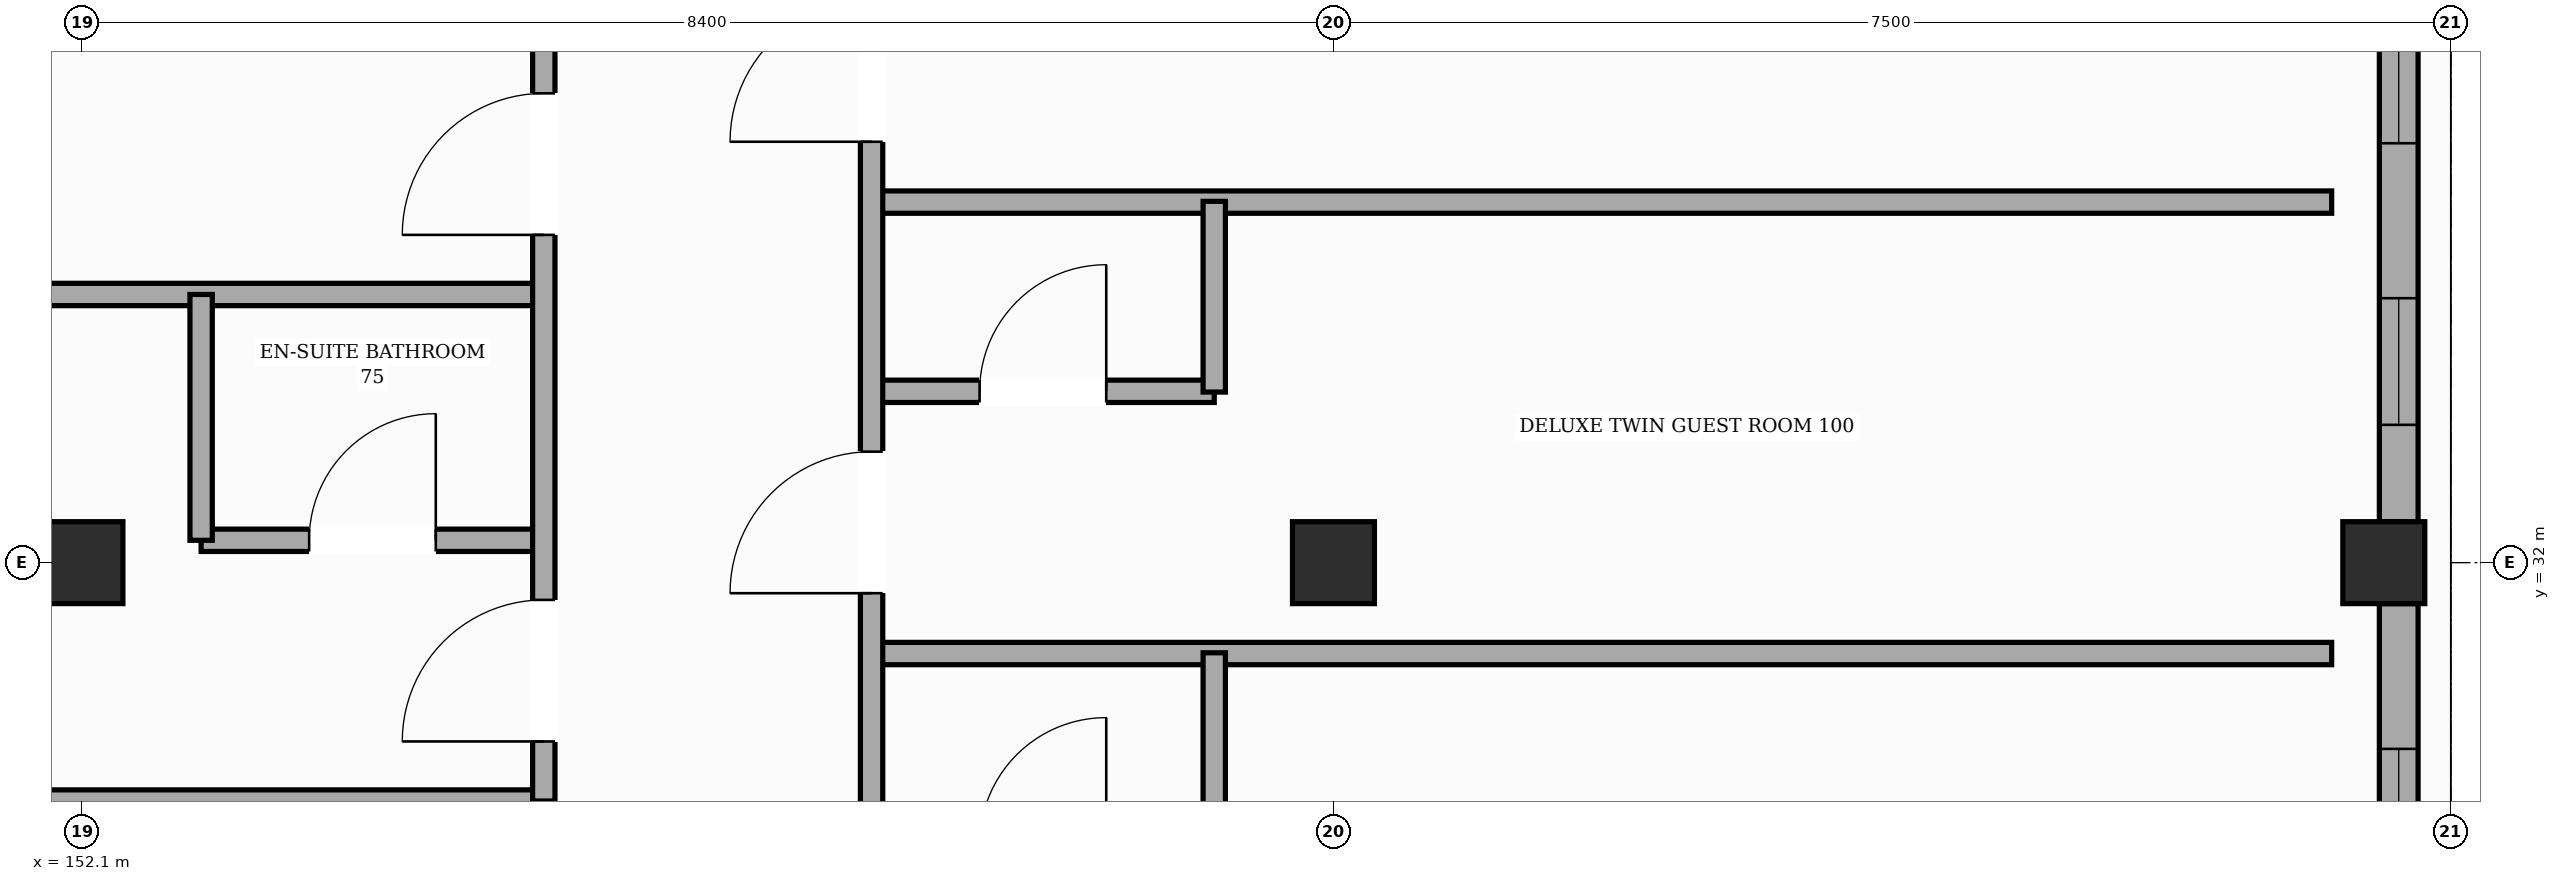
"""IFC4 building model, lengths in metres.
Left out: names, types, materials, properties, quantities, classifications, styles, units other than length and angle.
Written with IfcOpenShell. Run it as: python <this file> out.ifc"""

import sys

from ifc_helpers import new_model, si_unit, direction, frame, frame_2d, origin, origin_2d, place, context, subcontext, project, spatial, rectangle, hollow_rectangle, extrude, element, fill, save


model = new_model("IFC4")
c1 = context("Model", 3, precision=1e-05, world=origin(), true_north=direction((0.0, 1.0)))
c2 = subcontext(c1, "Body", "Model", "MODEL_VIEW")
j1 = project(units=[si_unit("LENGTHUNIT", "METRE"), si_unit("PLANEANGLEUNIT", "RADIAN")], contexts=[c1])
p1 = place(None, origin())
s1 = spatial("IfcSite", under=j1, at=p1, CompositionType="ELEMENT")
p2 = place(p1, origin())
s2 = spatial("IfcBuilding", under=s1, at=p2, CompositionType="ELEMENT")
p3 = place(p2, frame((0.0, 0.0, 24.6)))
s3 = spatial("IfcBuildingStorey", under=s2, at=p3, CompositionType="ELEMENT", Elevation=24.6)
for number, where, z_axis, x_axis in (
    (1, (152.1, 32.0, 0.0), (0.0, 0.0, 1.0), (1.0, 0.0, 0.0)),
    (2, (160.5, 32.0, 0.0), (0.0, 0.0, 1.0), (1.0, 0.0, 0.0)),
    (3, (167.55, 32.0, 0.0), (0.0, 0.0, 1.0), (1.0, 0.0, 0.0)),
):
    element("IfcColumn", number, at=place(p3, frame(where, z_axis=z_axis, x_axis=x_axis)), inside=s3, PredefinedType="COLUMN", context=c2, shape_type="SweptSolid", body=[
        extrude(hollow_rectangle(XDim=0.55, YDim=0.55, WallThickness=0.022, InnerFilletRadius=0.022, OuterFilletRadius=0.044, at=origin_2d()), origin(), (0.0, 0.0, 1.0), 3.6),
    ])
p4 = place(p3, frame((167.65, 31.725, 0.0), z_axis=(0.0, 0.0, 1.0), x_axis=(0.0, -1.0, 0.0)))
e4 = element("IfcWall", 4, at=p4, inside=s3, PredefinedType="SOLIDWALL", context=c2, shape_type="SweptSolid", body=[
    extrude(rectangle(XDim=7.45, YDim=0.26, at=frame_2d((3.725, 0.0))), origin(), (0.0, 0.0, 1.0), 2.755),
])
p5 = place(p4, frame((4.105, 0.0, 0.85)))
e5 = element("IfcOpeningElement", 5, at=p5, cuts=e4, PredefinedType="OPENING", context=c2, shape_type="SweptSolid", body=[
    extrude(rectangle(XDim=1.55, YDim=1.35, at=frame_2d((0.775, 0.675))), frame((0.0, 0.14, 0.0), z_axis=(0.0, -1.0, 0.0), x_axis=(1.0, 0.0, 0.0)), (0.0, 0.0, 1.0), 0.28),
])
p6 = place(p4, frame((0.975, 0.0, 0.85)))
e6 = element("IfcOpeningElement", 6, at=p6, cuts=e4, PredefinedType="OPENING", context=c2, shape_type="SweptSolid", body=[
    extrude(rectangle(XDim=1.75, YDim=1.35, at=frame_2d((0.875, 0.675))), frame((0.0, 0.14, 0.0), z_axis=(0.0, -1.0, 0.0), x_axis=(1.0, 0.0, 0.0)), (0.0, 0.0, 1.0), 0.28),
])
p7 = place(p3, frame((167.65, 40.625, 0.0), z_axis=(0.0, 0.0, 1.0), x_axis=(0.0, -1.0, 0.0)))
e7 = element("IfcWall", 7, at=p7, inside=s3, PredefinedType="SOLIDWALL", context=c2, shape_type="SweptSolid", body=[
    extrude(rectangle(XDim=8.35, YDim=0.26, at=frame_2d((4.175, 0.0))), origin(), (0.0, 0.0, 1.0), 2.755),
])
p8 = place(p7, frame((6.85, 0.0, 0.85)))
e8 = element("IfcOpeningElement", 8, at=p8, cuts=e7, PredefinedType="OPENING", context=c2, shape_type="SweptSolid", body=[
    extrude(rectangle(XDim=0.85, YDim=1.35, at=frame_2d((0.425, 0.675))), frame((0.0, 0.14, 0.0), z_axis=(0.0, -1.0, 0.0), x_axis=(1.0, 0.0, 0.0)), (0.0, 0.0, 1.0), 0.28),
])
p9 = place(p7, frame((3.56, 0.0, 0.85)))
e9 = element("IfcOpeningElement", 9, at=p9, cuts=e7, PredefinedType="OPENING", context=c2, shape_type="SweptSolid", body=[
    extrude(rectangle(XDim=2.25, YDim=1.35, at=frame_2d((1.125, 0.675))), frame((0.0, 0.14, 0.0), z_axis=(0.0, -1.0, 0.0), x_axis=(1.0, 0.0, 0.0)), (0.0, 0.0, 1.0), 0.28),
])
p10 = place(p7, frame((1.03, 0.0, 0.85)))
e10 = element("IfcOpeningElement", 10, at=p10, cuts=e7, PredefinedType="OPENING", context=c2, shape_type="SweptSolid", body=[
    extrude(rectangle(XDim=1.25, YDim=1.35, at=frame_2d((0.625, 0.675))), frame((0.0, 0.14, 0.0), z_axis=(0.0, -1.0, 0.0), x_axis=(1.0, 0.0, 0.0)), (0.0, 0.0, 1.0), 0.28),
])
p11 = place(p3, frame((144.2, 30.4, 0.0), z_axis=(0.0, 0.0, 1.0), x_axis=(1.0, 0.0, 0.0)))
e11 = element("IfcWall", 11, at=p11, inside=s3, PredefinedType="PARTITIONING", context=c2, shape_type="SweptSolid", body=[
    extrude(rectangle(XDim=11.0, YDim=0.15, at=frame_2d((5.5, 0.0))), origin(), (0.0, 0.0, 1.0), 3.365),
])
p12 = place(p3, frame((157.4, 31.39, 0.0), z_axis=(0.0, 0.0, 1.0), x_axis=(1.0, 0.0, 0.0)))
e12 = element("IfcWall", 12, at=p12, inside=s3, PredefinedType="PARTITIONING", context=c2, shape_type="SweptSolid", body=[
    extrude(rectangle(XDim=9.8, YDim=0.15, at=frame_2d((4.9, 0.0))), origin(), (0.0, 0.0, 1.0), 3.365),
])
p13 = place(p3, frame((152.9, 32.15, 0.0), z_axis=(0.0, 0.0, 1.0), x_axis=(1.0, 0.0, 0.0)))
e13 = element("IfcWall", 13, at=p13, inside=s3, PredefinedType="PARTITIONING", context=c2, shape_type="SweptSolid", body=[
    extrude(rectangle(XDim=2.3, YDim=0.15, at=frame_2d((1.15, 0.0))), origin(), (0.0, 0.0, 1.0), 2.805),
])
p14 = place(p13, frame((0.725, 0.0, 0.0)))
e14 = element("IfcOpeningElement", 14, at=p14, cuts=e13, PredefinedType="OPENING", context=c2, shape_type="SweptSolid", body=[
    extrude(rectangle(XDim=0.85, YDim=2.1, at=frame_2d((0.425, 1.05))), frame((0.0, 0.085, 0.0), z_axis=(0.0, -1.0, 0.0), x_axis=(1.0, 0.0, 0.0)), (0.0, 0.0, 1.0), 0.17),
])
p15 = place(p3, frame((157.4, 33.15, 0.0), z_axis=(0.0, 0.0, 1.0), x_axis=(1.0, 0.0, 0.0)))
e15 = element("IfcWall", 15, at=p15, inside=s3, PredefinedType="PARTITIONING", context=c2, shape_type="SweptSolid", body=[
    extrude(rectangle(XDim=2.3, YDim=0.15, at=frame_2d((1.15, 0.0))), origin(), (0.0, 0.0, 1.0), 3.365),
])
p16 = place(p15, frame((0.725, 0.0, 0.0)))
e16 = element("IfcOpeningElement", 16, at=p16, cuts=e15, PredefinedType="OPENING", context=c2, shape_type="SweptSolid", body=[
    extrude(rectangle(XDim=0.85, YDim=2.1, at=frame_2d((0.425, 1.05))), frame((0.0, 0.085, 0.0), z_axis=(0.0, -1.0, 0.0), x_axis=(1.0, 0.0, 0.0)), (0.0, 0.0, 1.0), 0.17),
])
p17 = place(p3, frame((144.2, 33.8, 0.0), z_axis=(0.0, 0.0, 1.0), x_axis=(1.0, 0.0, 0.0)))
e17 = element("IfcWall", 17, at=p17, inside=s3, PredefinedType="PARTITIONING", context=c2, shape_type="SweptSolid", body=[
    extrude(rectangle(XDim=11.0, YDim=0.15, at=frame_2d((5.5, 0.0))), origin(), (0.0, 0.0, 1.0), 3.365),
])
p18 = place(p3, frame((157.4, 34.42, 0.0), z_axis=(0.0, 0.0, 1.0), x_axis=(1.0, 0.0, 0.0)))
e18 = element("IfcWall", 18, at=p18, inside=s3, PredefinedType="PARTITIONING", context=c2, shape_type="SweptSolid", body=[
    extrude(rectangle(XDim=9.8, YDim=0.15, at=frame_2d((4.9, 0.0))), origin(), (0.0, 0.0, 1.0), 3.365),
])
p19 = place(p3, frame((152.9, 32.15, 0.0), z_axis=(0.0, 0.0, 1.0), x_axis=(0.0, 1.0, 0.0)))
e19 = element("IfcWall", 19, at=p19, inside=s3, PredefinedType="PARTITIONING", context=c2, shape_type="SweptSolid", body=[
    extrude(rectangle(XDim=1.65, YDim=0.15, at=frame_2d((0.825, 0.0))), origin(), (0.0, 0.0, 1.0), 3.365),
])
p20 = place(p3, frame((155.2, 30.4, 0.0), z_axis=(0.0, 0.0, 1.0), x_axis=(0.0, 1.0, 0.0)))
e20 = element("IfcWall", 20, at=p20, inside=s3, PredefinedType="PARTITIONING", context=c2, shape_type="SweptSolid", body=[
    extrude(rectangle(XDim=10.2, YDim=0.15, at=frame_2d((5.1, 0.0))), origin(), (0.0, 0.0, 1.0), 3.365),
])
p21 = place(p20, frame((0.4, 0.0, 0.0)))
e21 = element("IfcOpeningElement", 21, at=p21, cuts=e20, PredefinedType="OPENING", context=c2, shape_type="SweptSolid", body=[
    extrude(rectangle(XDim=0.95, YDim=2.15, at=frame_2d((0.475, 1.075))), frame((0.0, 0.085, 0.0), z_axis=(0.0, -1.0, 0.0), x_axis=(1.0, 0.0, 0.0)), (0.0, 0.0, 1.0), 0.17),
])
p22 = place(p20, frame((3.8, 0.0, 0.0)))
e22 = element("IfcOpeningElement", 22, at=p22, cuts=e20, PredefinedType="OPENING", context=c2, shape_type="SweptSolid", body=[
    extrude(rectangle(XDim=0.95, YDim=2.15, at=frame_2d((0.475, 1.075))), frame((0.0, 0.085, 0.0), z_axis=(0.0, -1.0, 0.0), x_axis=(1.0, 0.0, 0.0)), (0.0, 0.0, 1.0), 0.17),
])
p23 = place(p20, frame((7.2, 0.0, 0.0)))
e23 = element("IfcOpeningElement", 23, at=p23, cuts=e20, PredefinedType="OPENING", context=c2, shape_type="SweptSolid", body=[
    extrude(rectangle(XDim=0.95, YDim=2.15, at=frame_2d((0.475, 1.075))), frame((0.0, 0.085, 0.0), z_axis=(0.0, -1.0, 0.0), x_axis=(1.0, 0.0, 0.0)), (0.0, 0.0, 1.0), 0.17),
])
p24 = place(p3, frame((157.4, 22.3, 0.0), z_axis=(0.0, 0.0, 1.0), x_axis=(0.0, 1.0, 0.0)))
e24 = element("IfcWall", 24, at=p24, inside=s3, PredefinedType="PARTITIONING", context=c2, shape_type="SweptSolid", body=[
    extrude(rectangle(XDim=48.5, YDim=0.15, at=frame_2d((24.25, 0.0))), origin(), (0.0, 0.0, 1.0), 3.365),
])
p25 = place(p24, frame((0.4, 0.0, 0.0)))
e25 = element("IfcOpeningElement", 25, at=p25, cuts=e24, PredefinedType="OPENING", context=c2, shape_type="SweptSolid", body=[
    extrude(rectangle(XDim=0.95, YDim=2.15, at=frame_2d((0.475, 1.075))), frame((0.0, 0.085, 0.0), z_axis=(0.0, -1.0, 0.0), x_axis=(1.0, 0.0, 0.0)), (0.0, 0.0, 1.0), 0.17),
])
p26 = place(p24, frame((3.43, 0.0, 0.0)))
e26 = element("IfcOpeningElement", 26, at=p26, cuts=e24, PredefinedType="OPENING", context=c2, shape_type="SweptSolid", body=[
    extrude(rectangle(XDim=0.95, YDim=2.15, at=frame_2d((0.475, 1.075))), frame((0.0, 0.085, 0.0), z_axis=(0.0, -1.0, 0.0), x_axis=(1.0, 0.0, 0.0)), (0.0, 0.0, 1.0), 0.17),
])
p27 = place(p24, frame((6.46, 0.0, 0.0)))
e27 = element("IfcOpeningElement", 27, at=p27, cuts=e24, PredefinedType="OPENING", context=c2, shape_type="SweptSolid", body=[
    extrude(rectangle(XDim=0.95, YDim=2.15, at=frame_2d((0.475, 1.075))), frame((0.0, 0.085, 0.0), z_axis=(0.0, -1.0, 0.0), x_axis=(1.0, 0.0, 0.0)), (0.0, 0.0, 1.0), 0.17),
])
p28 = place(p24, frame((9.495, 0.0, 0.0)))
e28 = element("IfcOpeningElement", 28, at=p28, cuts=e24, PredefinedType="OPENING", context=c2, shape_type="SweptSolid", body=[
    extrude(rectangle(XDim=0.95, YDim=2.15, at=frame_2d((0.475, 1.075))), frame((0.0, 0.085, 0.0), z_axis=(0.0, -1.0, 0.0), x_axis=(1.0, 0.0, 0.0)), (0.0, 0.0, 1.0), 0.17),
])
p29 = place(p24, frame((12.525, 0.0, 0.0)))
e29 = element("IfcOpeningElement", 29, at=p29, cuts=e24, PredefinedType="OPENING", context=c2, shape_type="SweptSolid", body=[
    extrude(rectangle(XDim=0.95, YDim=2.15, at=frame_2d((0.475, 1.075))), frame((0.0, 0.085, 0.0), z_axis=(0.0, -1.0, 0.0), x_axis=(1.0, 0.0, 0.0)), (0.0, 0.0, 1.0), 0.17),
])
p30 = place(p24, frame((15.555, 0.0, 0.0)))
e30 = element("IfcOpeningElement", 30, at=p30, cuts=e24, PredefinedType="OPENING", context=c2, shape_type="SweptSolid", body=[
    extrude(rectangle(XDim=0.95, YDim=2.15, at=frame_2d((0.475, 1.075))), frame((0.0, 0.085, 0.0), z_axis=(0.0, -1.0, 0.0), x_axis=(1.0, 0.0, 0.0)), (0.0, 0.0, 1.0), 0.17),
])
p31 = place(p24, frame((18.585, 0.0, 0.0)))
e31 = element("IfcOpeningElement", 31, at=p31, cuts=e24, PredefinedType="OPENING", context=c2, shape_type="SweptSolid", body=[
    extrude(rectangle(XDim=0.95, YDim=2.15, at=frame_2d((0.475, 1.075))), frame((0.0, 0.085, 0.0), z_axis=(0.0, -1.0, 0.0), x_axis=(1.0, 0.0, 0.0)), (0.0, 0.0, 1.0), 0.17),
])
p32 = place(p24, frame((21.62, 0.0, 0.0)))
e32 = element("IfcOpeningElement", 32, at=p32, cuts=e24, PredefinedType="OPENING", context=c2, shape_type="SweptSolid", body=[
    extrude(rectangle(XDim=0.95, YDim=2.15, at=frame_2d((0.475, 1.075))), frame((0.0, 0.085, 0.0), z_axis=(0.0, -1.0, 0.0), x_axis=(1.0, 0.0, 0.0)), (0.0, 0.0, 1.0), 0.17),
])
p33 = place(p24, frame((24.65, 0.0, 0.0)))
e33 = element("IfcOpeningElement", 33, at=p33, cuts=e24, PredefinedType="OPENING", context=c2, shape_type="SweptSolid", body=[
    extrude(rectangle(XDim=0.95, YDim=2.15, at=frame_2d((0.475, 1.075))), frame((0.0, 0.085, 0.0), z_axis=(0.0, -1.0, 0.0), x_axis=(1.0, 0.0, 0.0)), (0.0, 0.0, 1.0), 0.17),
])
p34 = place(p24, frame((27.68, 0.0, 0.0)))
e34 = element("IfcOpeningElement", 34, at=p34, cuts=e24, PredefinedType="OPENING", context=c2, shape_type="SweptSolid", body=[
    extrude(rectangle(XDim=0.95, YDim=2.15, at=frame_2d((0.475, 1.075))), frame((0.0, 0.085, 0.0), z_axis=(0.0, -1.0, 0.0), x_axis=(1.0, 0.0, 0.0)), (0.0, 0.0, 1.0), 0.17),
])
p35 = place(p24, frame((30.71, 0.0, 0.0)))
e35 = element("IfcOpeningElement", 35, at=p35, cuts=e24, PredefinedType="OPENING", context=c2, shape_type="SweptSolid", body=[
    extrude(rectangle(XDim=0.95, YDim=2.15, at=frame_2d((0.475, 1.075))), frame((0.0, 0.085, 0.0), z_axis=(0.0, -1.0, 0.0), x_axis=(1.0, 0.0, 0.0)), (0.0, 0.0, 1.0), 0.17),
])
p36 = place(p24, frame((33.745, 0.0, 0.0)))
e36 = element("IfcOpeningElement", 36, at=p36, cuts=e24, PredefinedType="OPENING", context=c2, shape_type="SweptSolid", body=[
    extrude(rectangle(XDim=0.95, YDim=2.15, at=frame_2d((0.475, 1.075))), frame((0.0, 0.085, 0.0), z_axis=(0.0, -1.0, 0.0), x_axis=(1.0, 0.0, 0.0)), (0.0, 0.0, 1.0), 0.17),
])
p37 = place(p24, frame((36.775, 0.0, 0.0)))
e37 = element("IfcOpeningElement", 37, at=p37, cuts=e24, PredefinedType="OPENING", context=c2, shape_type="SweptSolid", body=[
    extrude(rectangle(XDim=0.95, YDim=2.15, at=frame_2d((0.475, 1.075))), frame((0.0, 0.085, 0.0), z_axis=(0.0, -1.0, 0.0), x_axis=(1.0, 0.0, 0.0)), (0.0, 0.0, 1.0), 0.17),
])
p38 = place(p24, frame((39.805, 0.0, 0.0)))
e38 = element("IfcOpeningElement", 38, at=p38, cuts=e24, PredefinedType="OPENING", context=c2, shape_type="SweptSolid", body=[
    extrude(rectangle(XDim=0.95, YDim=2.15, at=frame_2d((0.475, 1.075))), frame((0.0, 0.085, 0.0), z_axis=(0.0, -1.0, 0.0), x_axis=(1.0, 0.0, 0.0)), (0.0, 0.0, 1.0), 0.17),
])
p39 = place(p24, frame((42.84, 0.0, 0.0)))
e39 = element("IfcOpeningElement", 39, at=p39, cuts=e24, PredefinedType="OPENING", context=c2, shape_type="SweptSolid", body=[
    extrude(rectangle(XDim=0.95, YDim=2.15, at=frame_2d((0.475, 1.075))), frame((0.0, 0.085, 0.0), z_axis=(0.0, -1.0, 0.0), x_axis=(1.0, 0.0, 0.0)), (0.0, 0.0, 1.0), 0.17),
])
p40 = place(p24, frame((45.87, 0.0, 0.0)))
e40 = element("IfcOpeningElement", 40, at=p40, cuts=e24, PredefinedType="OPENING", context=c2, shape_type="SweptSolid", body=[
    extrude(rectangle(XDim=0.95, YDim=2.15, at=frame_2d((0.475, 1.075))), frame((0.0, 0.085, 0.0), z_axis=(0.0, -1.0, 0.0), x_axis=(1.0, 0.0, 0.0)), (0.0, 0.0, 1.0), 0.17),
])
p41 = place(p3, frame((159.7, 30.11, 0.0), z_axis=(0.0, 0.0, 1.0), x_axis=(0.0, 1.0, 0.0)))
e41 = element("IfcWall", 41, at=p41, inside=s3, PredefinedType="PARTITIONING", context=c2, shape_type="SweptSolid", body=[
    extrude(rectangle(XDim=1.285, YDim=0.15, at=frame_2d((0.643, 0.0))), origin(), (0.0, 0.0, 1.0), 3.365),
])
p42 = place(p3, frame((159.7, 33.145, 0.0), z_axis=(0.0, 0.0, 1.0), x_axis=(0.0, 1.0, 0.0)))
e42 = element("IfcWall", 42, at=p42, inside=s3, PredefinedType="PARTITIONING", context=c2, shape_type="SweptSolid", body=[
    extrude(rectangle(XDim=1.28, YDim=0.15, at=frame_2d((0.64, 0.0))), origin(), (0.0, 0.0, 1.0), 3.365),
])
p43 = place(p6, origin())
e43 = element("IfcWindow", 43, at=p43, inside=s3, PartitioningType="SINGLE_PANEL", PredefinedType="WINDOW", context=c2, shape_type="SweptSolid", body=[
    extrude(rectangle(XDim=1.75, YDim=1.35, at=frame_2d((0.875, 0.675))), frame((0.0, 0.03, 0.0), z_axis=(0.0, -1.0, 0.0), x_axis=(1.0, 0.0, 0.0)), (0.0, 0.0, 1.0), 0.06),
])
fill(e6, e43)
p44 = place(p8, origin())
e44 = element("IfcWindow", 44, at=p44, inside=s3, PartitioningType="SINGLE_PANEL", PredefinedType="WINDOW", context=c2, shape_type="SweptSolid", body=[
    extrude(rectangle(XDim=0.85, YDim=1.35, at=frame_2d((0.425, 0.675))), frame((0.0, 0.03, 0.0), z_axis=(0.0, -1.0, 0.0), x_axis=(1.0, 0.0, 0.0)), (0.0, 0.0, 1.0), 0.06),
])
fill(e8, e44)
p45 = place(p9, origin())
e45 = element("IfcWindow", 45, at=p45, inside=s3, PartitioningType="SINGLE_PANEL", PredefinedType="WINDOW", context=c2, shape_type="SweptSolid", body=[
    extrude(rectangle(XDim=2.25, YDim=1.35, at=frame_2d((1.125, 0.675))), frame((0.0, 0.03, 0.0), z_axis=(0.0, -1.0, 0.0), x_axis=(1.0, 0.0, 0.0)), (0.0, 0.0, 1.0), 0.06),
])
fill(e9, e45)
p46 = place(p21, origin())
e46 = element("IfcDoor", 46, at=p46, inside=s3, OperationType="SINGLE_SWING_LEFT", PredefinedType="DOOR", context=c2, shape_type="SweptSolid", body=[
    extrude(rectangle(XDim=0.95, YDim=2.15, at=frame_2d((0.475, 1.075))), frame((0.0, 0.025, 0.0), z_axis=(0.0, -1.0, 0.0), x_axis=(1.0, 0.0, 0.0)), (0.0, 0.0, 1.0), 0.05),
])
fill(e21, e46)
p47 = place(p14, origin())
e47 = element("IfcDoor", 47, at=p47, inside=s3, OperationType="SINGLE_SWING_RIGHT", PredefinedType="DOOR", context=c2, shape_type="SweptSolid", body=[
    extrude(rectangle(XDim=0.85, YDim=2.1, at=frame_2d((0.425, 1.05))), frame((0.0, 0.025, 0.0), z_axis=(0.0, -1.0, 0.0), x_axis=(1.0, 0.0, 0.0)), (0.0, 0.0, 1.0), 0.05),
])
fill(e14, e47)
p48 = place(p22, origin())
e48 = element("IfcDoor", 48, at=p48, inside=s3, OperationType="SINGLE_SWING_LEFT", PredefinedType="DOOR", context=c2, shape_type="SweptSolid", body=[
    extrude(rectangle(XDim=0.95, YDim=2.15, at=frame_2d((0.475, 1.075))), frame((0.0, 0.025, 0.0), z_axis=(0.0, -1.0, 0.0), x_axis=(1.0, 0.0, 0.0)), (0.0, 0.0, 1.0), 0.05),
])
fill(e22, e48)
p49 = place(p28, origin())
e49 = element("IfcDoor", 49, at=p49, inside=s3, OperationType="SINGLE_SWING_LEFT", PredefinedType="DOOR", context=c2, shape_type="SweptSolid", body=[
    extrude(rectangle(XDim=0.95, YDim=2.15, at=frame_2d((0.475, 1.075))), frame((0.0, 0.025, 0.0), z_axis=(0.0, -1.0, 0.0), x_axis=(1.0, 0.0, 0.0)), (0.0, 0.0, 1.0), 0.05),
])
fill(e28, e49)
p50 = place(p16, origin())
e50 = element("IfcDoor", 50, at=p50, inside=s3, OperationType="SINGLE_SWING_RIGHT", PredefinedType="DOOR", context=c2, shape_type="SweptSolid", body=[
    extrude(rectangle(XDim=0.85, YDim=2.1, at=frame_2d((0.425, 1.05))), frame((0.0, 0.025, 0.0), z_axis=(0.0, -1.0, 0.0), x_axis=(1.0, 0.0, 0.0)), (0.0, 0.0, 1.0), 0.05),
])
fill(e16, e50)
p51 = place(p29, origin())
e51 = element("IfcDoor", 51, at=p51, inside=s3, OperationType="SINGLE_SWING_LEFT", PredefinedType="DOOR", context=c2, shape_type="SweptSolid", body=[
    extrude(rectangle(XDim=0.95, YDim=2.15, at=frame_2d((0.475, 1.075))), frame((0.0, 0.025, 0.0), z_axis=(0.0, -1.0, 0.0), x_axis=(1.0, 0.0, 0.0)), (0.0, 0.0, 1.0), 0.05),
])
fill(e29, e51)
save(model, sys.argv[1])
